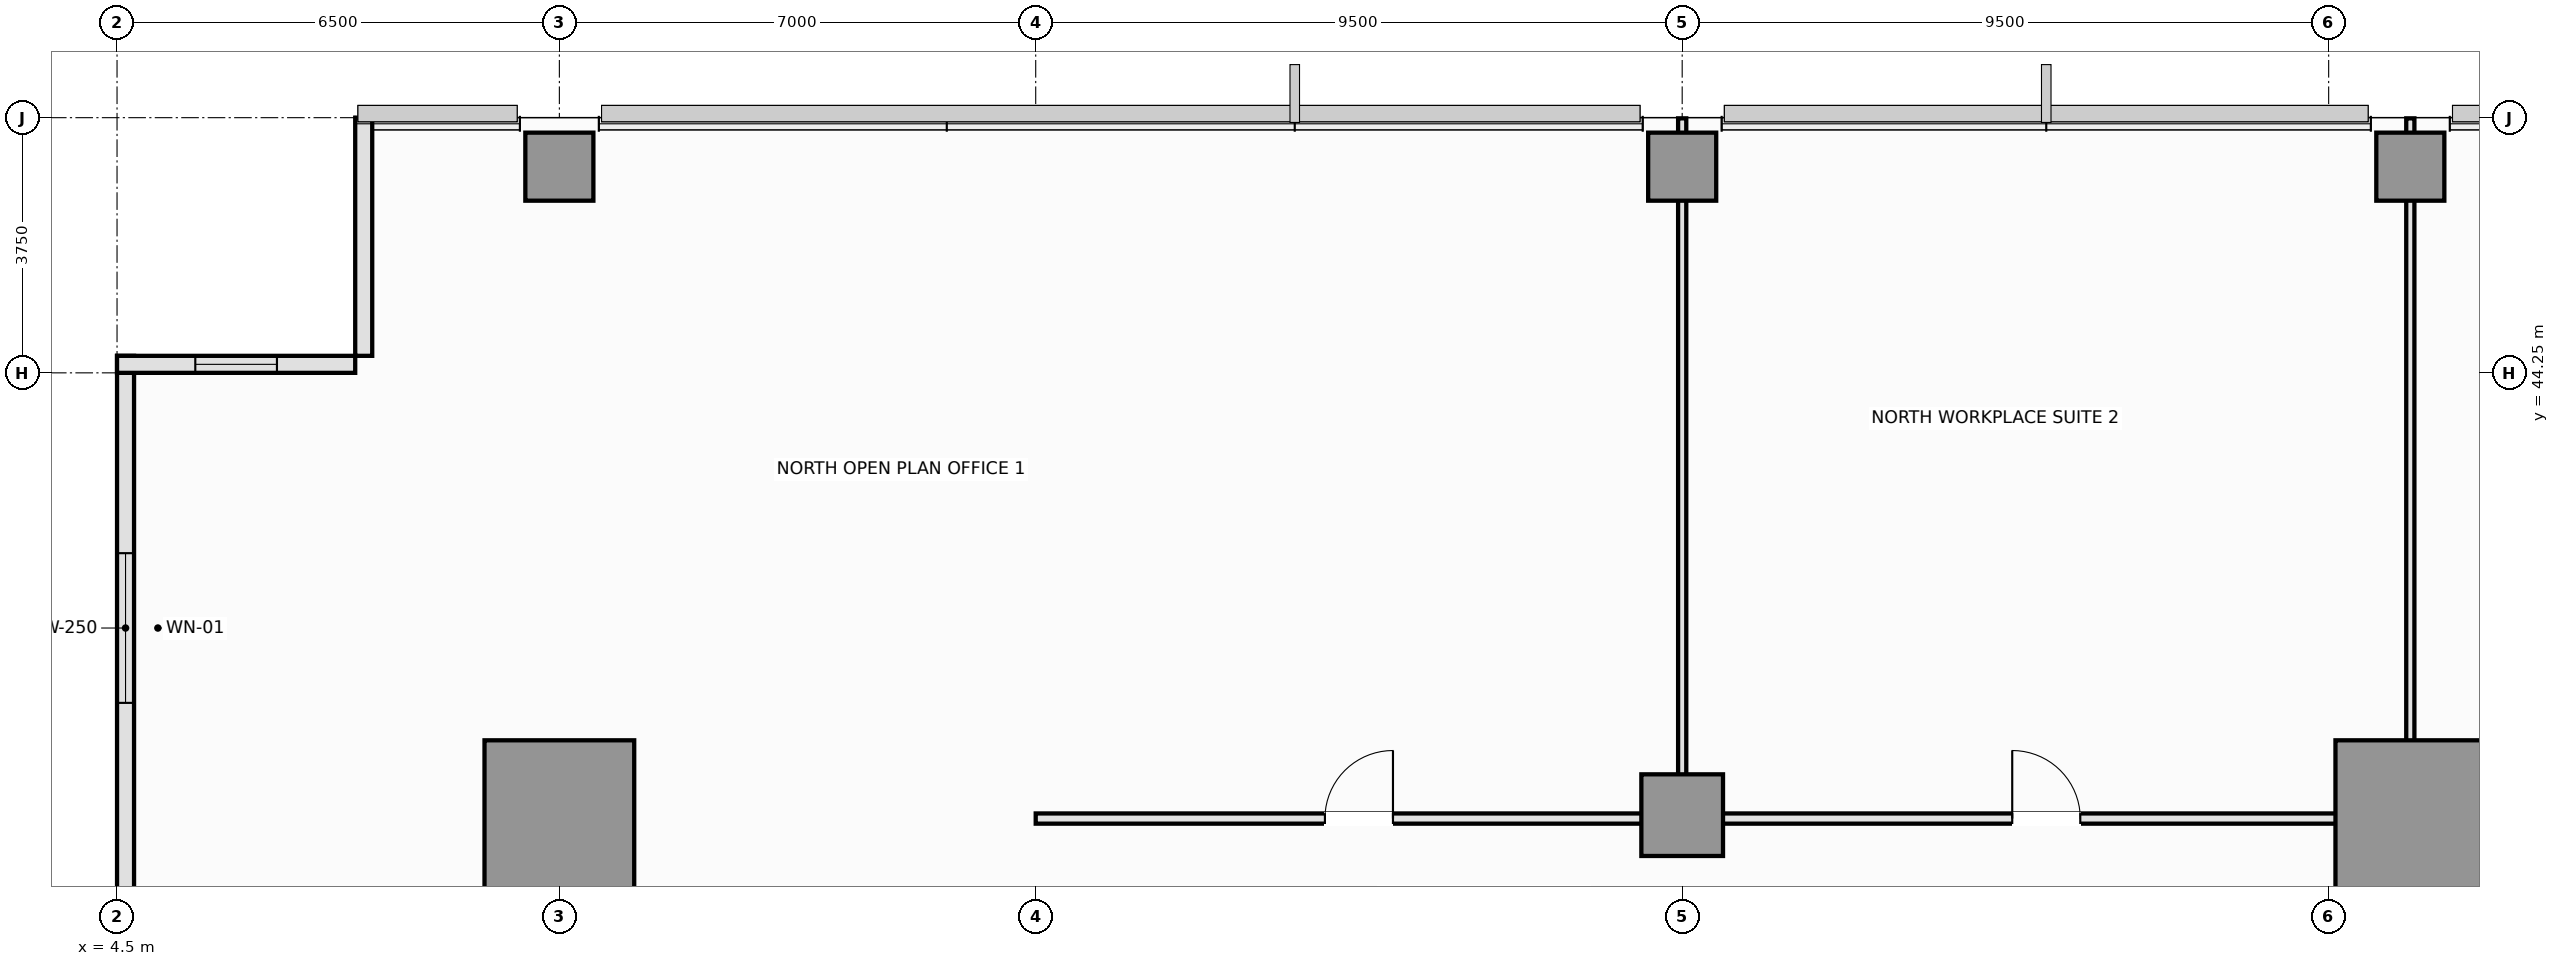
"""IFC4 building model, lengths in metres.
Left out: names, types, materials, properties, quantities, classifications, styles, units other than length and angle.
Written with IfcOpenShell. Run it as: python <this file> out.ifc"""

import sys

from ifc_helpers import new_model, si_unit, direction, frame, frame_2d, origin, origin_2d, place, context, subcontext, project, spatial, rectangle, extrude, element, fill, save


model = new_model("IFC4")
c1 = context("Model", 3, precision=1e-05, world=origin(), true_north=direction((0.0, 1.0)))
c2 = subcontext(c1, "Body", "Model", "MODEL_VIEW")
j1 = project(units=[si_unit("LENGTHUNIT", "METRE"), si_unit("PLANEANGLEUNIT", "RADIAN")], contexts=[c1])
p1 = place(None, origin())
s1 = spatial("IfcSite", under=j1, at=p1, CompositionType="ELEMENT")
p2 = place(p1, origin())
s2 = spatial("IfcBuilding", under=s1, at=p2, CompositionType="ELEMENT")
p3 = place(p2, frame((0.0, 0.0, 29.15)))
s3 = spatial("IfcBuildingStorey", under=s2, at=p3, CompositionType="ELEMENT", Elevation=29.15)
for number, where, z_axis, x_axis in (
    (1, (11.0, 37.75, 0.0), (0.0, 0.0, 1.0), (1.0, 0.0, 0.0)),
    (2, (38.2, 37.75, 0.0), (0.0, 0.0, 1.0), (1.0, 0.0, 0.0)),
):
    element("IfcColumn", number, at=place(p3, frame(where, z_axis=z_axis, x_axis=x_axis)), inside=s3, PredefinedType="COLUMN", context=c2, shape_type="SweptSolid", body=[
        extrude(rectangle(XDim=2.2, YDim=2.2, at=origin_2d()), origin(), (0.0, 0.0, 1.0), 3.55),
    ])
p4 = place(p3, frame((27.5, 37.75, 0.0), z_axis=(0.0, 0.0, 1.0), x_axis=(1.0, 0.0, 0.0)))
e3 = element("IfcColumn", 3, at=p4, inside=s3, PredefinedType="COLUMN", context=c2, shape_type="SweptSolid", body=[
    extrude(rectangle(XDim=1.2, YDim=1.2, at=origin_2d()), origin(), (0.0, 0.0, 1.0), 3.55),
])
for number, where, z_axis, x_axis in (
    (4, (11.0, 47.28, 0.0), (0.0, 0.0, 1.0), (1.0, 0.0, 0.0)),
    (5, (27.5, 47.28, 0.0), (0.0, 0.0, 1.0), (1.0, 0.0, 0.0)),
    (6, (38.2, 47.28, 0.0), (0.0, 0.0, 1.0), (1.0, 0.0, 0.0)),
):
    element("IfcColumn", number, at=place(p3, frame(where, z_axis=z_axis, x_axis=x_axis)), inside=s3, PredefinedType="COLUMN", context=c2, shape_type="SweptSolid", body=[
        extrude(rectangle(XDim=1.0, YDim=1.0, at=origin_2d()), origin(), (0.0, 0.0, 1.0), 3.55),
    ])
p5 = place(p3, frame((4.625, 44.5, 0.0), z_axis=(0.0, 0.0, 1.0), x_axis=(0.0, -1.0, 0.0)))
e7 = element("IfcWall", 7, at=p5, inside=s3, PredefinedType="SOLIDWALL", context=c2, shape_type="SweptSolid", body=[
    extrude(rectangle(XDim=8.0, YDim=0.25, at=frame_2d((4.0, 0.0))), origin(), (0.0, 0.0, 1.0), 3.37),
])
p6 = place(p5, frame((2.9, 0.0, 0.9)))
e8 = element("IfcOpeningElement", 8, at=p6, cuts=e7, PredefinedType="OPENING", context=c2, shape_type="SweptSolid", body=[
    extrude(rectangle(XDim=2.2, YDim=1.8, at=frame_2d((1.1, 0.9))), frame((0.0, 0.135, 0.0), z_axis=(0.0, -1.0, 0.0), x_axis=(1.0, 0.0, 0.0)), (0.0, 0.0, 1.0), 0.27),
])
p7 = place(p3, frame((8.125, 48.0, 0.0), z_axis=(0.0, 0.0, 1.0), x_axis=(0.0, -1.0, 0.0)))
e9 = element("IfcWall", 9, at=p7, inside=s3, PredefinedType="SOLIDWALL", context=c2, shape_type="SweptSolid", body=[
    extrude(rectangle(XDim=3.5, YDim=0.25, at=frame_2d((1.75, 0.0))), origin(), (0.0, 0.0, 1.0), 3.37),
])
p8 = place(p3, frame((8.0, 44.375, 0.0), z_axis=(0.0, 0.0, 1.0), x_axis=(-1.0, 0.0, 0.0)))
e10 = element("IfcWall", 10, at=p8, inside=s3, PredefinedType="SOLIDWALL", context=c2, shape_type="SweptSolid", body=[
    extrude(rectangle(XDim=3.5, YDim=0.25, at=frame_2d((1.75, 0.0))), origin(), (0.0, 0.0, 1.0), 3.37),
])
p9 = place(p8, frame((1.15, 0.0, 0.9)))
e11 = element("IfcOpeningElement", 11, at=p9, cuts=e10, PredefinedType="OPENING", context=c2, shape_type="SweptSolid", body=[
    extrude(rectangle(XDim=1.2, YDim=1.8, at=frame_2d((0.6, 0.9))), frame((0.0, 0.135, 0.0), z_axis=(0.0, -1.0, 0.0), x_axis=(1.0, 0.0, 0.0)), (0.0, 0.0, 1.0), 0.27),
])
p10 = place(p3, frame((18.0, 37.7, 0.0), z_axis=(0.0, 0.0, 1.0), x_axis=(1.0, 0.0, 0.0)))
e12 = element("IfcWall", 12, at=p10, inside=s3, PredefinedType="PARTITIONING", context=c2, shape_type="SweptSolid", body=[
    extrude(rectangle(XDim=9.5, YDim=0.15, at=frame_2d((4.75, 0.0))), origin(), (0.0, 0.0, 1.0), 2.72),
])
p11 = place(p10, frame((4.25, 0.0, 0.0)))
e13 = element("IfcOpeningElement", 13, at=p11, cuts=e12, PredefinedType="OPENING", context=c2, shape_type="SweptSolid", body=[
    extrude(rectangle(XDim=1.0, YDim=2.15, at=frame_2d((0.5, 1.075))), frame((0.0, 0.085, 0.0), z_axis=(0.0, -1.0, 0.0), x_axis=(1.0, 0.0, 0.0)), (0.0, 0.0, 1.0), 0.17),
])
p12 = place(p3, frame((27.5, 37.7, 0.0), z_axis=(0.0, 0.0, 1.0), x_axis=(1.0, 0.0, 0.0)))
e14 = element("IfcWall", 14, at=p12, inside=s3, PredefinedType="PARTITIONING", context=c2, shape_type="SweptSolid", body=[
    extrude(rectangle(XDim=10.7, YDim=0.15, at=frame_2d((5.35, 0.0))), origin(), (0.0, 0.0, 1.0), 2.72),
])
p13 = place(p12, frame((4.85, 0.0, 0.0)))
e15 = element("IfcOpeningElement", 15, at=p13, cuts=e14, PredefinedType="OPENING", context=c2, shape_type="SweptSolid", body=[
    extrude(rectangle(XDim=1.0, YDim=2.15, at=frame_2d((0.5, 1.075))), frame((0.0, 0.085, 0.0), z_axis=(0.0, -1.0, 0.0), x_axis=(1.0, 0.0, 0.0)), (0.0, 0.0, 1.0), 0.17),
])
p14 = place(p3, frame((38.2, 35.8, 0.0), z_axis=(0.0, 0.0, 1.0), x_axis=(0.0, 1.0, 0.0)))
e16 = element("IfcWall", 16, at=p14, inside=s3, PredefinedType="PARTITIONING", context=c2, shape_type="SweptSolid", body=[
    extrude(rectangle(XDim=1.9, YDim=0.15, at=frame_2d((0.95, 0.0))), origin(), (0.0, 0.0, 1.0), 2.82),
])
for number, where, z_axis, x_axis in (
    (17, (27.5, 37.7, 0.0), (0.0, 0.0, 1.0), (0.0, 1.0, 0.0)),
    (18, (38.2, 37.7, 0.0), (0.0, 0.0, 1.0), (0.0, 1.0, 0.0)),
):
    element("IfcWall", number, at=place(p3, frame(where, z_axis=z_axis, x_axis=x_axis)), inside=s3, PredefinedType="PARTITIONING", context=c2, shape_type="SweptSolid", body=[
        extrude(rectangle(XDim=10.29, YDim=0.12, at=frame_2d((5.145, 0.0))), origin(), (0.0, 0.0, 1.0), 2.82),
    ])
p15 = place(p6, origin())
e19 = element("IfcWindow", 19, at=p15, inside=s3, PartitioningType="SINGLE_PANEL", PredefinedType="WINDOW", context=c2, shape_type="SweptSolid", body=[
    extrude(rectangle(XDim=2.2, YDim=1.8, at=frame_2d((1.1, 0.9))), frame((0.0, 0.03, 0.0), z_axis=(0.0, -1.0, 0.0), x_axis=(1.0, 0.0, 0.0)), (0.0, 0.0, 1.0), 0.06),
])
fill(e8, e19)
p16 = place(p9, origin())
e20 = element("IfcWindow", 20, at=p16, inside=s3, PartitioningType="SINGLE_PANEL", PredefinedType="WINDOW", context=c2, shape_type="SweptSolid", body=[
    extrude(rectangle(XDim=1.2, YDim=1.8, at=frame_2d((0.6, 0.9))), frame((0.0, 0.03, 0.0), z_axis=(0.0, -1.0, 0.0), x_axis=(1.0, 0.0, 0.0)), (0.0, 0.0, 1.0), 0.06),
])
fill(e11, e20)
p17 = place(p11, origin())
e21 = element("IfcDoor", 21, at=p17, inside=s3, OperationType="SINGLE_SWING_RIGHT", PredefinedType="DOOR", context=c2, shape_type="SweptSolid", body=[
    extrude(rectangle(XDim=1.0, YDim=2.15, at=frame_2d((0.5, 1.075))), frame((0.0, 0.025, 0.0), z_axis=(0.0, -1.0, 0.0), x_axis=(1.0, 0.0, 0.0)), (0.0, 0.0, 1.0), 0.05),
])
fill(e13, e21)
p18 = place(p13, origin())
e22 = element("IfcDoor", 22, at=p18, inside=s3, OperationType="SINGLE_SWING_LEFT", PredefinedType="DOOR", context=c2, shape_type="SweptSolid", body=[
    extrude(rectangle(XDim=1.0, YDim=2.15, at=frame_2d((0.5, 1.075))), frame((0.0, 0.025, 0.0), z_axis=(0.0, -1.0, 0.0), x_axis=(1.0, 0.0, 0.0)), (0.0, 0.0, 1.0), 0.05),
])
fill(e15, e22)
save(model, sys.argv[1])
